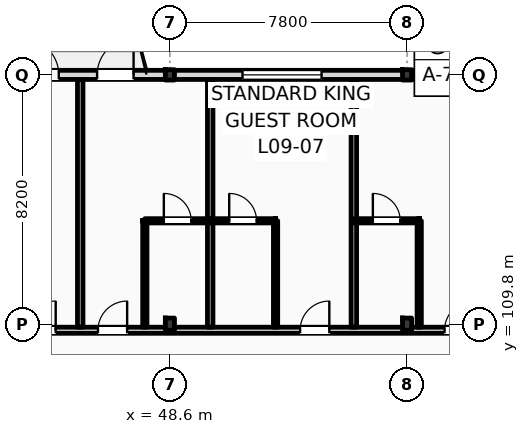
"""IFC4 building model, lengths in metres.
Left out: names, types, materials, properties, quantities, classifications, styles, units other than length and angle.
Written with IfcOpenShell. Run it as: python <this file> out.ifc"""

import sys

from ifc_helpers import new_model, si_unit, direction, frame, frame_2d, origin, origin_2d, place, context, subcontext, project, spatial, rectangle, i_section, extrude, element, fill, save


model = new_model("IFC4")
c1 = context("Model", 3, precision=1e-05, world=origin(), true_north=direction((0.0, 1.0)))
c2 = subcontext(c1, "Body", "Model", "MODEL_VIEW")
j1 = project(units=[si_unit("LENGTHUNIT", "METRE"), si_unit("PLANEANGLEUNIT", "RADIAN")], contexts=[c1])
p1 = place(None, origin())
s1 = spatial("IfcSite", under=j1, at=p1, CompositionType="ELEMENT")
p2 = place(p1, origin())
s2 = spatial("IfcBuilding", under=s1, at=p2, CompositionType="ELEMENT")
p3 = place(p2, frame((0.0, 0.0, 39.0)))
s3 = spatial("IfcBuildingStorey", under=s2, at=p3, CompositionType="ELEMENT", Elevation=39.0)
p4 = place(p3, frame((48.6, 109.8, 0.0), z_axis=(0.0, 0.0, 1.0), x_axis=(1.0, 0.0, 0.0)))
e1 = element("IfcColumn", 1, at=p4, inside=s3, PredefinedType="COLUMN", context=c2, shape_type="SweptSolid", body=[
    extrude(i_section(OverallWidth=0.3, OverallDepth=0.4, WebThickness=0.013, FlangeThickness=0.024, FilletRadius=0.027, at=origin_2d()), origin(), (0.0, 0.0, 1.0), 3.6),
])
p5 = place(p3, frame((48.6, 118.0, 0.0), z_axis=(0.0, 0.0, 1.0), x_axis=(1.0, 0.0, 0.0)))
e2 = element("IfcColumn", 2, at=p5, inside=s3, PredefinedType="COLUMN", context=c2, shape_type="SweptSolid", body=[
    extrude(i_section(OverallWidth=0.3, OverallDepth=0.34, WebThickness=0.012, FlangeThickness=0.021, FilletRadius=0.027, at=origin_2d()), origin(), (0.0, 0.0, 1.0), 3.6),
])
p6 = place(p3, frame((56.4, 109.8, 0.0), z_axis=(0.0, 0.0, 1.0), x_axis=(1.0, 0.0, 0.0)))
e3 = element("IfcColumn", 3, at=p6, inside=s3, PredefinedType="COLUMN", context=c2, shape_type="SweptSolid", body=[
    extrude(i_section(OverallWidth=0.3, OverallDepth=0.4, WebThickness=0.013, FlangeThickness=0.024, FilletRadius=0.027, at=origin_2d()), origin(), (0.0, 0.0, 1.0), 3.6),
])
p7 = place(p3, frame((56.4, 118.0, 0.0), z_axis=(0.0, 0.0, 1.0), x_axis=(1.0, 0.0, 0.0)))
e4 = element("IfcColumn", 4, at=p7, inside=s3, PredefinedType="COLUMN", context=c2, shape_type="SweptSolid", body=[
    extrude(i_section(OverallWidth=0.3, OverallDepth=0.34, WebThickness=0.012, FlangeThickness=0.021, FilletRadius=0.027, at=origin_2d()), origin(), (0.0, 0.0, 1.0), 3.6),
])
p8 = place(p3, frame((22.5, 118.0, 0.0), z_axis=(0.0, 0.0, 1.0), x_axis=(1.0, 0.0, 0.0)))
e5 = element("IfcWall", 5, at=p8, inside=s3, PredefinedType="STANDARD", context=c2, shape_type="SweptSolid", body=[
    extrude(rectangle(XDim=72.9, YDim=0.3, at=frame_2d((36.45, 0.0))), origin(), (0.0, 0.0, 1.0), 2.92),
])
p9 = place(p8, frame((3.6, 0.0, 0.9)))
e6 = element("IfcOpeningElement", 6, at=p9, cuts=e5, PredefinedType="OPENING", context=c2, shape_type="SweptSolid", body=[
    extrude(rectangle(XDim=1.1, YDim=1.6, at=frame_2d((0.55, 0.8))), frame((0.0, 0.16, 0.0), z_axis=(0.0, -1.0, 0.0), x_axis=(1.0, 0.0, 0.0)), (0.0, 0.0, 1.0), 0.32),
])
p10 = place(p8, frame((6.688, 0.0, 0.0)))
e7 = element("IfcOpeningElement", 7, at=p10, cuts=e5, PredefinedType="OPENING", context=c2, shape_type="SweptSolid", body=[
    extrude(rectangle(XDim=1.2, YDim=2.25, at=frame_2d((0.6, 1.125))), frame((0.0, 0.16, 0.0), z_axis=(0.0, -1.0, 0.0), x_axis=(1.0, 0.0, 0.0)), (0.0, 0.0, 1.0), 0.32),
])
p11 = place(p8, frame((11.388, 0.0, 0.9)))
e8 = element("IfcOpeningElement", 8, at=p11, cuts=e5, PredefinedType="OPENING", context=c2, shape_type="SweptSolid", body=[
    extrude(rectangle(XDim=1.6, YDim=1.75, at=frame_2d((0.8, 0.875))), frame((0.0, 0.16, 0.0), z_axis=(0.0, -1.0, 0.0), x_axis=(1.0, 0.0, 0.0)), (0.0, 0.0, 1.0), 0.32),
])
p12 = place(p8, frame((15.413, 0.0, 0.9)))
e9 = element("IfcOpeningElement", 9, at=p12, cuts=e5, PredefinedType="OPENING", context=c2, shape_type="SweptSolid", body=[
    extrude(rectangle(XDim=1.75, YDim=1.84, at=frame_2d((0.875, 0.92))), frame((0.0, 0.16, 0.0), z_axis=(0.0, -1.0, 0.0), x_axis=(1.0, 0.0, 0.0)), (0.0, 0.0, 1.0), 0.32),
])
p13 = place(p8, frame((21.245, 0.0, 0.0)))
e10 = element("IfcOpeningElement", 10, at=p13, cuts=e5, PredefinedType="OPENING", context=c2, shape_type="SweptSolid", body=[
    extrude(rectangle(XDim=1.2, YDim=2.25, at=frame_2d((0.6, 1.125))), frame((0.0, 0.16, 0.0), z_axis=(0.0, -1.0, 0.0), x_axis=(1.0, 0.0, 0.0)), (0.0, 0.0, 1.0), 0.32),
])
p14 = place(p8, frame((23.705, 0.0, 0.0)))
e11 = element("IfcOpeningElement", 11, at=p14, cuts=e5, PredefinedType="OPENING", context=c2, shape_type="SweptSolid", body=[
    extrude(rectangle(XDim=1.2, YDim=2.25, at=frame_2d((0.6, 1.125))), frame((0.0, 0.16, 0.0), z_axis=(0.0, -1.0, 0.0), x_axis=(1.0, 0.0, 0.0)), (0.0, 0.0, 1.0), 0.32),
])
p15 = place(p8, frame((28.488, 0.0, 0.9)))
e12 = element("IfcOpeningElement", 12, at=p15, cuts=e5, PredefinedType="OPENING", context=c2, shape_type="SweptSolid", body=[
    extrude(rectangle(XDim=2.6, YDim=1.84, at=frame_2d((1.3, 0.92))), frame((0.0, 0.16, 0.0), z_axis=(0.0, -1.0, 0.0), x_axis=(1.0, 0.0, 0.0)), (0.0, 0.0, 1.0), 0.32),
])
p16 = place(p8, frame((34.76, 0.0, 0.9)))
e13 = element("IfcOpeningElement", 13, at=p16, cuts=e5, PredefinedType="OPENING", context=c2, shape_type="SweptSolid", body=[
    extrude(rectangle(XDim=1.1, YDim=1.84, at=frame_2d((0.55, 0.92))), frame((0.0, 0.16, 0.0), z_axis=(0.0, -1.0, 0.0), x_axis=(1.0, 0.0, 0.0)), (0.0, 0.0, 1.0), 0.32),
])
p17 = place(p8, frame((38.143, 0.0, 0.0)))
e14 = element("IfcOpeningElement", 14, at=p17, cuts=e5, PredefinedType="OPENING", context=c2, shape_type="SweptSolid", body=[
    extrude(rectangle(XDim=1.2, YDim=2.25, at=frame_2d((0.6, 1.125))), frame((0.0, 0.16, 0.0), z_axis=(0.0, -1.0, 0.0), x_axis=(1.0, 0.0, 0.0)), (0.0, 0.0, 1.0), 0.32),
])
p18 = place(p8, frame((42.687, 0.0, 0.9)))
e15 = element("IfcOpeningElement", 15, at=p18, cuts=e5, PredefinedType="OPENING", context=c2, shape_type="SweptSolid", body=[
    extrude(rectangle(XDim=1.2, YDim=1.8, at=frame_2d((0.6, 0.9))), frame((0.0, 0.16, 0.0), z_axis=(0.0, -1.0, 0.0), x_axis=(1.0, 0.0, 0.0)), (0.0, 0.0, 1.0), 0.32),
])
p19 = place(p8, frame((47.112, 0.0, 0.9)))
e16 = element("IfcOpeningElement", 16, at=p19, cuts=e5, PredefinedType="OPENING", context=c2, shape_type="SweptSolid", body=[
    extrude(rectangle(XDim=1.35, YDim=1.84, at=frame_2d((0.675, 0.92))), frame((0.0, 0.16, 0.0), z_axis=(0.0, -1.0, 0.0), x_axis=(1.0, 0.0, 0.0)), (0.0, 0.0, 1.0), 0.32),
])
p20 = place(p8, frame((52.482, 0.0, 0.0)))
e17 = element("IfcOpeningElement", 17, at=p20, cuts=e5, PredefinedType="OPENING", context=c2, shape_type="SweptSolid", body=[
    extrude(rectangle(XDim=1.2, YDim=2.25, at=frame_2d((0.6, 1.125))), frame((0.0, 0.16, 0.0), z_axis=(0.0, -1.0, 0.0), x_axis=(1.0, 0.0, 0.0)), (0.0, 0.0, 1.0), 0.32),
])
p21 = place(p8, frame((54.942, 0.0, 0.0)))
e18 = element("IfcOpeningElement", 18, at=p21, cuts=e5, PredefinedType="OPENING", context=c2, shape_type="SweptSolid", body=[
    extrude(rectangle(XDim=1.2, YDim=2.25, at=frame_2d((0.6, 1.125))), frame((0.0, 0.16, 0.0), z_axis=(0.0, -1.0, 0.0), x_axis=(1.0, 0.0, 0.0)), (0.0, 0.0, 1.0), 0.32),
])
p22 = place(p8, frame((60.387, 0.0, 0.9)))
e19 = element("IfcOpeningElement", 19, at=p22, cuts=e5, PredefinedType="OPENING", context=c2, shape_type="SweptSolid", body=[
    extrude(rectangle(XDim=1.8, YDim=1.84, at=frame_2d((0.9, 0.92))), frame((0.0, 0.16, 0.0), z_axis=(0.0, -1.0, 0.0), x_axis=(1.0, 0.0, 0.0)), (0.0, 0.0, 1.0), 0.32),
])
p23 = place(p8, frame((66.013, 0.0, 0.9)))
e20 = element("IfcOpeningElement", 20, at=p23, cuts=e5, PredefinedType="OPENING", context=c2, shape_type="SweptSolid", body=[
    extrude(rectangle(XDim=1.35, YDim=1.84, at=frame_2d((0.675, 0.92))), frame((0.0, 0.16, 0.0), z_axis=(0.0, -1.0, 0.0), x_axis=(1.0, 0.0, 0.0)), (0.0, 0.0, 1.0), 0.32),
])
p24 = place(p8, frame((69.275, 0.0, 0.9)))
e21 = element("IfcOpeningElement", 21, at=p24, cuts=e5, PredefinedType="OPENING", context=c2, shape_type="SweptSolid", body=[
    extrude(rectangle(XDim=2.1, YDim=1.84, at=frame_2d((1.05, 0.92))), frame((0.0, 0.16, 0.0), z_axis=(0.0, -1.0, 0.0), x_axis=(1.0, 0.0, 0.0)), (0.0, 0.0, 1.0), 0.32),
])
p25 = place(p3, frame((10.65, 109.6, 0.0), z_axis=(0.0, 0.0, 1.0), x_axis=(1.0, 0.0, 0.0)))
e22 = element("IfcWall", 22, at=p25, inside=s3, PredefinedType="PARTITIONING", context=c2, shape_type="SweptSolid", body=[
    extrude(rectangle(XDim=84.61, YDim=0.2, at=frame_2d((42.305, 0.0))), origin(), (0.0, 0.0, 1.0), 2.82),
])
p26 = place(p25, frame((15.49, 0.0, 0.0)))
e23 = element("IfcOpeningElement", 23, at=p26, cuts=e22, PredefinedType="OPENING", context=c2, shape_type="SweptSolid", body=[
    extrude(rectangle(XDim=1.02, YDim=2.2, at=frame_2d((0.51, 1.1))), frame((0.0, 0.11, 0.0), z_axis=(0.0, -1.0, 0.0), x_axis=(1.0, 0.0, 0.0)), (0.0, 0.0, 1.0), 0.22),
])
p27 = place(p25, frame((19.703, 0.0, 0.0)))
e24 = element("IfcOpeningElement", 24, at=p27, cuts=e22, PredefinedType="OPENING", context=c2, shape_type="SweptSolid", body=[
    extrude(rectangle(XDim=1.02, YDim=2.2, at=frame_2d((0.51, 1.1))), frame((0.0, 0.11, 0.0), z_axis=(0.0, -1.0, 0.0), x_axis=(1.0, 0.0, 0.0)), (0.0, 0.0, 1.0), 0.22),
])
p28 = place(p25, frame((24.203, 0.0, 0.0)))
e25 = element("IfcOpeningElement", 25, at=p28, cuts=e22, PredefinedType="OPENING", context=c2, shape_type="SweptSolid", body=[
    extrude(rectangle(XDim=1.02, YDim=2.2, at=frame_2d((0.51, 1.1))), frame((0.0, 0.11, 0.0), z_axis=(0.0, -1.0, 0.0), x_axis=(1.0, 0.0, 0.0)), (0.0, 0.0, 1.0), 0.22),
])
p29 = place(p25, frame((26.552, 0.0, 0.0)))
e26 = element("IfcOpeningElement", 26, at=p29, cuts=e22, PredefinedType="OPENING", context=c2, shape_type="SweptSolid", body=[
    extrude(rectangle(XDim=1.02, YDim=2.2, at=frame_2d((0.51, 1.1))), frame((0.0, 0.11, 0.0), z_axis=(0.0, -1.0, 0.0), x_axis=(1.0, 0.0, 0.0)), (0.0, 0.0, 1.0), 0.22),
])
p30 = place(p25, frame((33.233, 0.0, 0.0)))
e27 = element("IfcOpeningElement", 27, at=p30, cuts=e22, PredefinedType="OPENING", context=c2, shape_type="SweptSolid", body=[
    extrude(rectangle(XDim=0.96, YDim=2.2, at=frame_2d((0.48, 1.1))), frame((0.0, 0.11, 0.0), z_axis=(0.0, -1.0, 0.0), x_axis=(1.0, 0.0, 0.0)), (0.0, 0.0, 1.0), 0.22),
])
p31 = place(p25, frame((35.583, 0.0, 0.0)))
e28 = element("IfcOpeningElement", 28, at=p31, cuts=e22, PredefinedType="OPENING", context=c2, shape_type="SweptSolid", body=[
    extrude(rectangle(XDim=0.96, YDim=2.2, at=frame_2d((0.48, 1.1))), frame((0.0, 0.11, 0.0), z_axis=(0.0, -1.0, 0.0), x_axis=(1.0, 0.0, 0.0)), (0.0, 0.0, 1.0), 0.22),
])
p32 = place(p25, frame((42.233, 0.0, 0.0)))
e29 = element("IfcOpeningElement", 29, at=p32, cuts=e22, PredefinedType="OPENING", context=c2, shape_type="SweptSolid", body=[
    extrude(rectangle(XDim=0.96, YDim=2.2, at=frame_2d((0.48, 1.1))), frame((0.0, 0.11, 0.0), z_axis=(0.0, -1.0, 0.0), x_axis=(1.0, 0.0, 0.0)), (0.0, 0.0, 1.0), 0.22),
])
p33 = place(p25, frame((46.983, 0.0, 0.0)))
e30 = element("IfcOpeningElement", 30, at=p33, cuts=e22, PredefinedType="OPENING", context=c2, shape_type="SweptSolid", body=[
    extrude(rectangle(XDim=0.96, YDim=2.2, at=frame_2d((0.48, 1.1))), frame((0.0, 0.11, 0.0), z_axis=(0.0, -1.0, 0.0), x_axis=(1.0, 0.0, 0.0)), (0.0, 0.0, 1.0), 0.22),
])
p34 = place(p25, frame((51.233, 0.0, 0.0)))
e31 = element("IfcOpeningElement", 31, at=p34, cuts=e22, PredefinedType="OPENING", context=c2, shape_type="SweptSolid", body=[
    extrude(rectangle(XDim=0.96, YDim=2.2, at=frame_2d((0.48, 1.1))), frame((0.0, 0.11, 0.0), z_axis=(0.0, -1.0, 0.0), x_axis=(1.0, 0.0, 0.0)), (0.0, 0.0, 1.0), 0.22),
])
p35 = place(p25, frame((55.733, 0.0, 0.0)))
e32 = element("IfcOpeningElement", 32, at=p35, cuts=e22, PredefinedType="OPENING", context=c2, shape_type="SweptSolid", body=[
    extrude(rectangle(XDim=0.96, YDim=2.2, at=frame_2d((0.48, 1.1))), frame((0.0, 0.11, 0.0), z_axis=(0.0, -1.0, 0.0), x_axis=(1.0, 0.0, 0.0)), (0.0, 0.0, 1.0), 0.22),
])
p36 = place(p25, frame((58.083, 0.0, 0.0)))
e33 = element("IfcOpeningElement", 33, at=p36, cuts=e22, PredefinedType="OPENING", context=c2, shape_type="SweptSolid", body=[
    extrude(rectangle(XDim=0.96, YDim=2.2, at=frame_2d((0.48, 1.1))), frame((0.0, 0.11, 0.0), z_axis=(0.0, -1.0, 0.0), x_axis=(1.0, 0.0, 0.0)), (0.0, 0.0, 1.0), 0.22),
])
p37 = place(p25, frame((64.732, 0.0, 0.0)))
e34 = element("IfcOpeningElement", 34, at=p37, cuts=e22, PredefinedType="OPENING", context=c2, shape_type="SweptSolid", body=[
    extrude(rectangle(XDim=0.96, YDim=2.2, at=frame_2d((0.48, 1.1))), frame((0.0, 0.11, 0.0), z_axis=(0.0, -1.0, 0.0), x_axis=(1.0, 0.0, 0.0)), (0.0, 0.0, 1.0), 0.22),
])
p38 = place(p25, frame((66.832, 0.0, 0.0)))
e35 = element("IfcOpeningElement", 35, at=p38, cuts=e22, PredefinedType="OPENING", context=c2, shape_type="SweptSolid", body=[
    extrude(rectangle(XDim=0.96, YDim=2.2, at=frame_2d((0.48, 1.1))), frame((0.0, 0.11, 0.0), z_axis=(0.0, -1.0, 0.0), x_axis=(1.0, 0.0, 0.0)), (0.0, 0.0, 1.0), 0.22),
])
p39 = place(p25, frame((73.732, 0.0, 0.0)))
e36 = element("IfcOpeningElement", 36, at=p39, cuts=e22, PredefinedType="OPENING", context=c2, shape_type="SweptSolid", body=[
    extrude(rectangle(XDim=0.96, YDim=2.2, at=frame_2d((0.48, 1.1))), frame((0.0, 0.11, 0.0), z_axis=(0.0, -1.0, 0.0), x_axis=(1.0, 0.0, 0.0)), (0.0, 0.0, 1.0), 0.22),
])
p40 = place(p25, frame((78.233, 0.0, 0.0)))
e37 = element("IfcOpeningElement", 37, at=p40, cuts=e22, PredefinedType="OPENING", context=c2, shape_type="SweptSolid", body=[
    extrude(rectangle(XDim=0.96, YDim=2.2, at=frame_2d((0.48, 1.1))), frame((0.0, 0.11, 0.0), z_axis=(0.0, -1.0, 0.0), x_axis=(1.0, 0.0, 0.0)), (0.0, 0.0, 1.0), 0.22),
])
p41 = place(p25, frame((80.62, 0.0, 0.0)))
e38 = element("IfcOpeningElement", 38, at=p41, cuts=e22, PredefinedType="OPENING", context=c2, shape_type="SweptSolid", body=[
    extrude(rectangle(XDim=0.96, YDim=2.2, at=frame_2d((0.48, 1.1))), frame((0.0, 0.11, 0.0), z_axis=(0.0, -1.0, 0.0), x_axis=(1.0, 0.0, 0.0)), (0.0, 0.0, 1.0), 0.22),
])
p42 = place(p25, frame((2.716, 0.0, 0.0)))
e39 = element("IfcOpeningElement", 39, at=p42, cuts=e22, PredefinedType="OPENING", context=c2, shape_type="SweptSolid", body=[
    extrude(rectangle(XDim=1.35, YDim=2.25, at=frame_2d((0.675, 1.125))), frame((0.0, 0.11, 0.0), z_axis=(0.0, -1.0, 0.0), x_axis=(1.0, 0.0, 0.0)), (0.0, 0.0, 1.0), 0.22),
])
p43 = place(p25, frame((6.65, 0.0, 0.0)))
e40 = element("IfcOpeningElement", 40, at=p43, cuts=e22, PredefinedType="OPENING", context=c2, shape_type="SweptSolid", body=[
    extrude(rectangle(XDim=1.35, YDim=2.25, at=frame_2d((0.675, 1.125))), frame((0.0, 0.11, 0.0), z_axis=(0.0, -1.0, 0.0), x_axis=(1.0, 0.0, 0.0)), (0.0, 0.0, 1.0), 0.22),
])
p44 = place(p25, frame((10.583, 0.0, 0.0)))
e41 = element("IfcOpeningElement", 41, at=p44, cuts=e22, PredefinedType="OPENING", context=c2, shape_type="SweptSolid", body=[
    extrude(rectangle(XDim=1.35, YDim=2.25, at=frame_2d((0.675, 1.125))), frame((0.0, 0.11, 0.0), z_axis=(0.0, -1.0, 0.0), x_axis=(1.0, 0.0, 0.0)), (0.0, 0.0, 1.0), 0.22),
])
for number, where, z_axis, x_axis in (
    (42, (45.65, 109.7, 0.0), (0.0, 0.0, 1.0), (0.0, 1.0, 0.0)),
    (43, (49.925, 109.7, 0.0), (0.0, 0.0, 1.0), (0.0, 1.0, 0.0)),
):
    element("IfcWall", number, at=place(p3, frame(where, z_axis=z_axis, x_axis=x_axis)), inside=s3, PredefinedType="PARTITIONING", context=c2, shape_type="SweptSolid", body=[
        extrude(rectangle(XDim=8.15, YDim=0.18, at=frame_2d((4.075, 0.0))), origin(), (0.0, 0.0, 1.0), 3.38),
    ])
p45 = place(p3, frame((47.775, 109.7, 0.0), z_axis=(0.0, 0.0, 1.0), x_axis=(0.0, 1.0, 0.0)))
e44 = element("IfcWall", 44, at=p45, inside=s3, PredefinedType="PARTITIONING", context=c2, shape_type="SweptSolid", body=[
    extrude(rectangle(XDim=3.5, YDim=0.14, at=frame_2d((1.75, 0.0))), origin(), (0.0, 0.0, 1.0), 3.38),
])
p46 = place(p3, frame((47.775, 113.2, 0.0), z_axis=(0.0, 0.0, 1.0), x_axis=(1.0, 0.0, 0.0)))
e45 = element("IfcWall", 45, at=p46, inside=s3, PredefinedType="PARTITIONING", context=c2, shape_type="SweptSolid", body=[
    extrude(rectangle(XDim=2.15, YDim=0.14, at=frame_2d((1.075, 0.0))), origin(), (0.0, 0.0, 1.0), 3.38),
])
p47 = place(p46, frame((0.625, 0.0, 0.0)))
e46 = element("IfcOpeningElement", 46, at=p47, cuts=e45, PredefinedType="OPENING", context=c2, shape_type="SweptSolid", body=[
    extrude(rectangle(XDim=0.9, YDim=2.1, at=frame_2d((0.45, 1.05))), frame((0.0, 0.08, 0.0), z_axis=(0.0, -1.0, 0.0), x_axis=(1.0, 0.0, 0.0)), (0.0, 0.0, 1.0), 0.16),
])
p48 = place(p3, frame((54.65, 109.7, 0.0), z_axis=(0.0, 0.0, 1.0), x_axis=(0.0, 1.0, 0.0)))
e47 = element("IfcWall", 47, at=p48, inside=s3, PredefinedType="PARTITIONING", context=c2, shape_type="SweptSolid", body=[
    extrude(rectangle(XDim=8.15, YDim=0.18, at=frame_2d((4.075, 0.0))), origin(), (0.0, 0.0, 1.0), 3.38),
])
p49 = place(p3, frame((52.075, 109.7, 0.0), z_axis=(0.0, 0.0, 1.0), x_axis=(0.0, 1.0, 0.0)))
e48 = element("IfcWall", 48, at=p49, inside=s3, PredefinedType="PARTITIONING", context=c2, shape_type="SweptSolid", body=[
    extrude(rectangle(XDim=3.5, YDim=0.14, at=frame_2d((1.75, 0.0))), origin(), (0.0, 0.0, 1.0), 3.38),
])
p50 = place(p3, frame((49.925, 113.2, 0.0), z_axis=(0.0, 0.0, 1.0), x_axis=(1.0, 0.0, 0.0)))
e49 = element("IfcWall", 49, at=p50, inside=s3, PredefinedType="PARTITIONING", context=c2, shape_type="SweptSolid", body=[
    extrude(rectangle(XDim=2.15, YDim=0.14, at=frame_2d((1.075, 0.0))), origin(), (0.0, 0.0, 1.0), 3.38),
])
p51 = place(p50, frame((0.625, 0.0, 0.0)))
e50 = element("IfcOpeningElement", 50, at=p51, cuts=e49, PredefinedType="OPENING", context=c2, shape_type="SweptSolid", body=[
    extrude(rectangle(XDim=0.9, YDim=2.1, at=frame_2d((0.45, 1.05))), frame((0.0, 0.08, 0.0), z_axis=(0.0, -1.0, 0.0), x_axis=(1.0, 0.0, 0.0)), (0.0, 0.0, 1.0), 0.16),
])
p52 = place(p3, frame((56.8, 109.7, 0.0), z_axis=(0.0, 0.0, 1.0), x_axis=(0.0, 1.0, 0.0)))
e51 = element("IfcWall", 51, at=p52, inside=s3, PredefinedType="PARTITIONING", context=c2, shape_type="SweptSolid", body=[
    extrude(rectangle(XDim=3.5, YDim=0.14, at=frame_2d((1.75, 0.0))), origin(), (0.0, 0.0, 1.0), 3.38),
])
p53 = place(p3, frame((54.65, 113.2, 0.0), z_axis=(0.0, 0.0, 1.0), x_axis=(1.0, 0.0, 0.0)))
e52 = element("IfcWall", 52, at=p53, inside=s3, PredefinedType="PARTITIONING", context=c2, shape_type="SweptSolid", body=[
    extrude(rectangle(XDim=2.15, YDim=0.14, at=frame_2d((1.075, 0.0))), origin(), (0.0, 0.0, 1.0), 3.38),
])
p54 = place(p53, frame((0.625, 0.0, 0.0)))
e53 = element("IfcOpeningElement", 53, at=p54, cuts=e52, PredefinedType="OPENING", context=c2, shape_type="SweptSolid", body=[
    extrude(rectangle(XDim=0.9, YDim=2.1, at=frame_2d((0.45, 1.05))), frame((0.0, 0.08, 0.0), z_axis=(0.0, -1.0, 0.0), x_axis=(1.0, 0.0, 0.0)), (0.0, 0.0, 1.0), 0.16),
])
p55 = place(p13, origin())
e54 = element("IfcDoor", 54, at=p55, inside=s3, OperationType="SINGLE_SWING_LEFT", PredefinedType="DOOR", context=c2, shape_type="SweptSolid", body=[
    extrude(rectangle(XDim=1.2, YDim=2.25, at=frame_2d((0.6, 1.125))), frame((0.0, 0.025, 0.0), z_axis=(0.0, -1.0, 0.0), x_axis=(1.0, 0.0, 0.0)), (0.0, 0.0, 1.0), 0.05),
])
fill(e10, e54)
p56 = place(p14, origin())
e55 = element("IfcDoor", 55, at=p56, inside=s3, OperationType="SINGLE_SWING_RIGHT", PredefinedType="DOOR", context=c2, shape_type="SweptSolid", body=[
    extrude(rectangle(XDim=1.2, YDim=2.25, at=frame_2d((0.6, 1.125))), frame((0.0, 0.025, 0.0), z_axis=(0.0, -1.0, 0.0), x_axis=(1.0, 0.0, 0.0)), (0.0, 0.0, 1.0), 0.05),
])
fill(e11, e55)
p57 = place(p15, origin())
e56 = element("IfcWindow", 56, at=p57, inside=s3, PartitioningType="DOUBLE_PANEL_VERTICAL", PredefinedType="WINDOW", context=c2, shape_type="SweptSolid", body=[
    extrude(rectangle(XDim=2.6, YDim=1.84, at=frame_2d((1.3, 0.92))), frame((0.0, 0.03, 0.0), z_axis=(0.0, -1.0, 0.0), x_axis=(1.0, 0.0, 0.0)), (0.0, 0.0, 1.0), 0.06),
])
fill(e12, e56)
p58 = place(p16, origin())
e57 = element("IfcWindow", 57, at=p58, inside=s3, PartitioningType="DOUBLE_PANEL_VERTICAL", PredefinedType="WINDOW", context=c2, shape_type="SweptSolid", body=[
    extrude(rectangle(XDim=1.1, YDim=1.84, at=frame_2d((0.55, 0.92))), frame((0.0, 0.03, 0.0), z_axis=(0.0, -1.0, 0.0), x_axis=(1.0, 0.0, 0.0)), (0.0, 0.0, 1.0), 0.06),
])
fill(e13, e57)
p59 = place(p30, origin())
e58 = element("IfcDoor", 58, at=p59, inside=s3, OperationType="SINGLE_SWING_RIGHT", PredefinedType="DOOR", context=c2, shape_type="SweptSolid", body=[
    extrude(rectangle(XDim=0.96, YDim=2.2, at=frame_2d((0.48, 1.1))), frame((0.0, 0.025, 0.0), z_axis=(0.0, -1.0, 0.0), x_axis=(1.0, 0.0, 0.0)), (0.0, 0.0, 1.0), 0.05),
])
fill(e27, e58)
p60 = place(p31, origin())
e59 = element("IfcDoor", 59, at=p60, inside=s3, OperationType="SINGLE_SWING_RIGHT", PredefinedType="DOOR", context=c2, shape_type="SweptSolid", body=[
    extrude(rectangle(XDim=0.96, YDim=2.2, at=frame_2d((0.48, 1.1))), frame((0.0, 0.025, 0.0), z_axis=(0.0, -1.0, 0.0), x_axis=(1.0, 0.0, 0.0)), (0.0, 0.0, 1.0), 0.05),
])
fill(e28, e59)
p61 = place(p47, origin())
e60 = element("IfcDoor", 60, at=p61, inside=s3, OperationType="SINGLE_SWING_LEFT", PredefinedType="DOOR", context=c2, shape_type="SweptSolid", body=[
    extrude(rectangle(XDim=0.9, YDim=2.1, at=frame_2d((0.45, 1.05))), frame((0.0, 0.025, 0.0), z_axis=(0.0, -1.0, 0.0), x_axis=(1.0, 0.0, 0.0)), (0.0, 0.0, 1.0), 0.05),
])
fill(e46, e60)
p62 = place(p32, origin())
e61 = element("IfcDoor", 61, at=p62, inside=s3, OperationType="SINGLE_SWING_RIGHT", PredefinedType="DOOR", context=c2, shape_type="SweptSolid", body=[
    extrude(rectangle(XDim=0.96, YDim=2.2, at=frame_2d((0.48, 1.1))), frame((0.0, 0.025, 0.0), z_axis=(0.0, -1.0, 0.0), x_axis=(1.0, 0.0, 0.0)), (0.0, 0.0, 1.0), 0.05),
])
fill(e29, e61)
p63 = place(p51, origin())
e62 = element("IfcDoor", 62, at=p63, inside=s3, OperationType="SINGLE_SWING_LEFT", PredefinedType="DOOR", context=c2, shape_type="SweptSolid", body=[
    extrude(rectangle(XDim=0.9, YDim=2.1, at=frame_2d((0.45, 1.05))), frame((0.0, 0.025, 0.0), z_axis=(0.0, -1.0, 0.0), x_axis=(1.0, 0.0, 0.0)), (0.0, 0.0, 1.0), 0.05),
])
fill(e50, e62)
p64 = place(p33, origin())
e63 = element("IfcDoor", 63, at=p64, inside=s3, OperationType="SINGLE_SWING_RIGHT", PredefinedType="DOOR", context=c2, shape_type="SweptSolid", body=[
    extrude(rectangle(XDim=0.96, YDim=2.2, at=frame_2d((0.48, 1.1))), frame((0.0, 0.025, 0.0), z_axis=(0.0, -1.0, 0.0), x_axis=(1.0, 0.0, 0.0)), (0.0, 0.0, 1.0), 0.05),
])
fill(e30, e63)
p65 = place(p54, origin())
e64 = element("IfcDoor", 64, at=p65, inside=s3, OperationType="SINGLE_SWING_LEFT", PredefinedType="DOOR", context=c2, shape_type="SweptSolid", body=[
    extrude(rectangle(XDim=0.9, YDim=2.1, at=frame_2d((0.45, 1.05))), frame((0.0, 0.025, 0.0), z_axis=(0.0, -1.0, 0.0), x_axis=(1.0, 0.0, 0.0)), (0.0, 0.0, 1.0), 0.05),
])
fill(e53, e64)
save(model, sys.argv[1])
